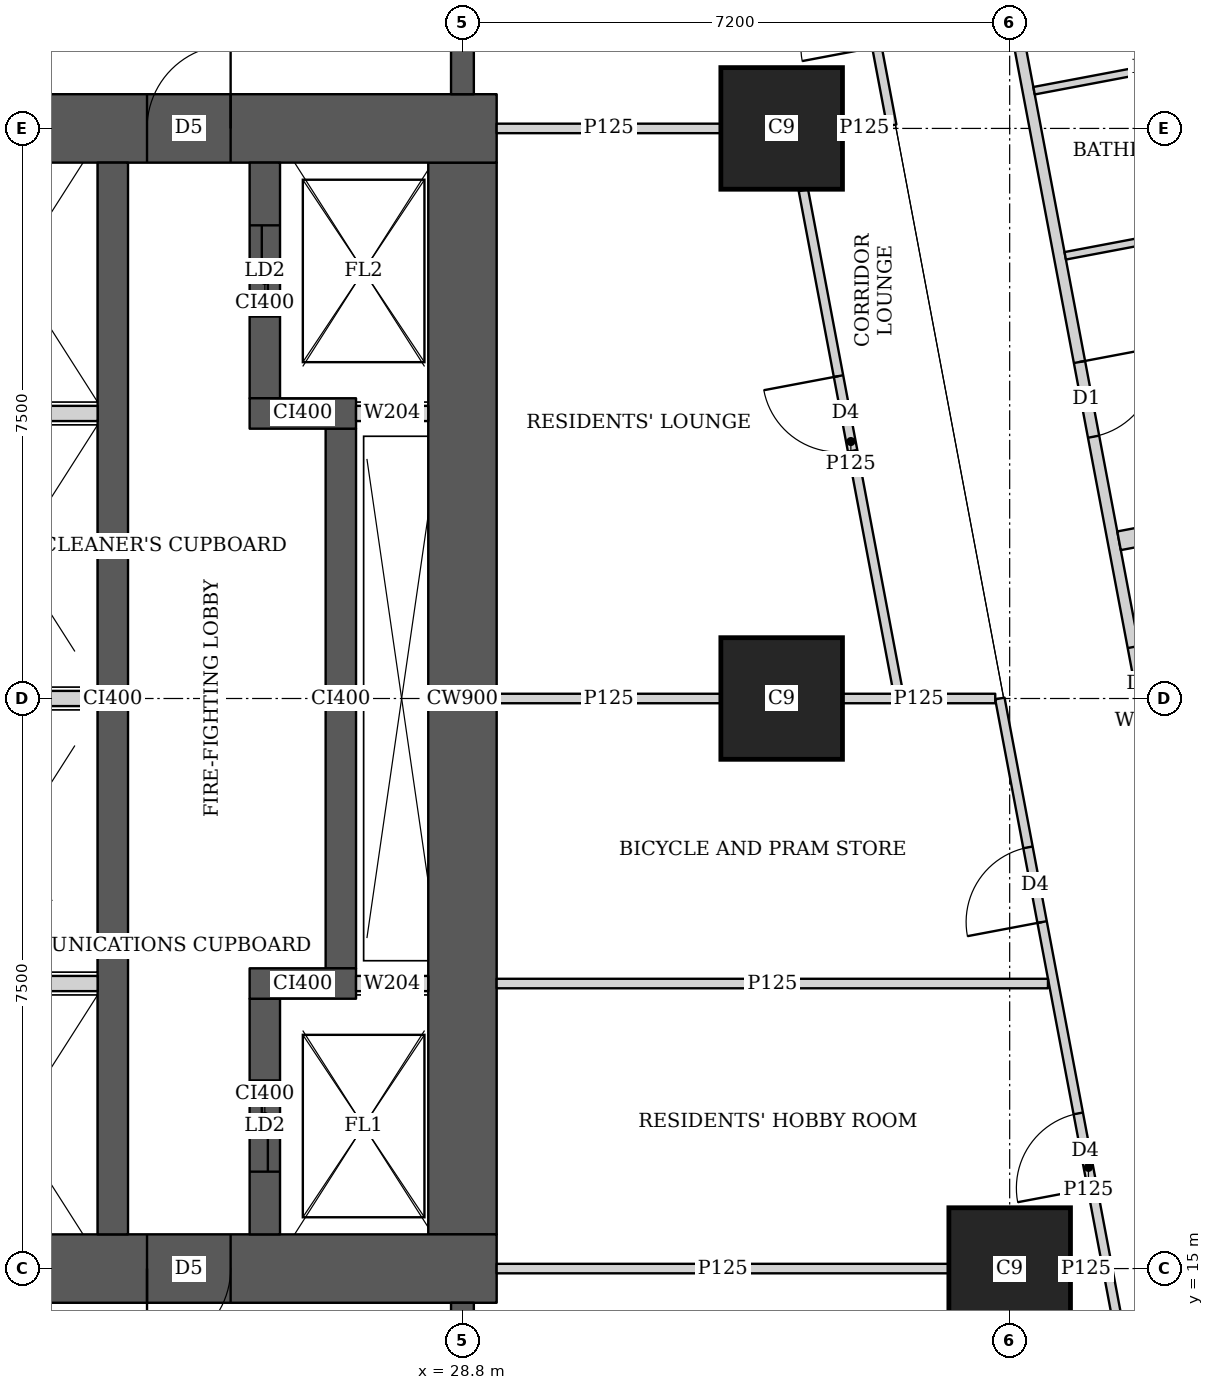
"""IFC4 building model, lengths in metres.
Left out: names, types, materials, properties, quantities, classifications, styles, units other than length and angle.
Written with IfcOpenShell. Run it as: python <this file> out.ifc"""

import sys

from ifc_helpers import new_model, si_unit, direction, frame, frame_2d, origin, origin_2d, place, context, subcontext, project, spatial, rectangle, extrude, element, fill, save


model = new_model("IFC4")
c1 = context("Model", 3, precision=1e-05, world=origin(), true_north=direction((0.0, 1.0)))
c2 = subcontext(c1, "Body", "Model", "MODEL_VIEW")
j1 = project(units=[si_unit("LENGTHUNIT", "METRE"), si_unit("PLANEANGLEUNIT", "RADIAN")], contexts=[c1])
p1 = place(None, origin())
s1 = spatial("IfcSite", under=j1, at=p1, CompositionType="ELEMENT")
p2 = place(p1, origin())
s2 = spatial("IfcBuilding", under=s1, at=p2, CompositionType="ELEMENT")
p3 = place(p2, frame((0.0, 0.0, 77.9)))
s3 = spatial("IfcBuildingStorey", under=s2, at=p3, CompositionType="ELEMENT", Elevation=77.9)
for number, where, z_axis, x_axis in (
    (1, (36.0, 15.0, 0.0), (0.0, 0.0, 1.0), (1.0, 0.0, 0.0)),
    (2, (33.0, 22.5, 0.0), (0.0, 0.0, 1.0), (1.0, 0.0, 0.0)),
    (3, (33.0, 30.0, 0.0), (0.0, 0.0, 1.0), (1.0, 0.0, 0.0)),
):
    element("IfcColumn", number, at=place(p3, frame(where, z_axis=z_axis, x_axis=x_axis)), inside=s3, PredefinedType="COLUMN", context=c2, shape_type="SweptSolid", body=[
        extrude(rectangle(XDim=1.6, YDim=1.6, at=origin_2d()), origin(), (0.0, 0.0, 1.0), 3.75),
    ])
p4 = place(p3, frame((13.95, 15.0, 0.0), z_axis=(0.0, 0.0, 1.0), x_axis=(1.0, 0.0, 0.0)))
e4 = element("IfcWall", 4, at=p4, inside=s3, PredefinedType="SHEAR", context=c2, shape_type="SweptSolid", body=[
    extrude(rectangle(XDim=15.3, YDim=0.9, at=frame_2d((7.65, 0.0))), origin(), (0.0, 0.0, 1.0), 3.75),
])
p5 = place(p4, frame((4.45, 0.0, 0.0)))
e5 = element("IfcOpeningElement", 5, at=p5, cuts=e4, PredefinedType="OPENING", context=c2, shape_type="SweptSolid", body=[
    extrude(rectangle(XDim=1.8, YDim=2.1, at=frame_2d((0.9, 1.05))), frame((0.0, 0.46, 0.0), z_axis=(0.0, -1.0, 0.0), x_axis=(1.0, 0.0, 0.0)), (0.0, 0.0, 1.0), 0.92),
])
p6 = place(p4, frame((10.7, 0.0, 0.0)))
e6 = element("IfcOpeningElement", 6, at=p6, cuts=e4, PredefinedType="OPENING", context=c2, shape_type="SweptSolid", body=[
    extrude(rectangle(XDim=1.1, YDim=2.1, at=frame_2d((0.55, 1.05))), frame((0.0, 0.46, 0.0), z_axis=(0.0, -1.0, 0.0), x_axis=(1.0, 0.0, 0.0)), (0.0, 0.0, 1.0), 0.92),
])
p7 = place(p3, frame((13.95, 30.0, 0.0), z_axis=(0.0, 0.0, 1.0), x_axis=(1.0, 0.0, 0.0)))
e7 = element("IfcWall", 7, at=p7, inside=s3, PredefinedType="SHEAR", context=c2, shape_type="SweptSolid", body=[
    extrude(rectangle(XDim=15.3, YDim=0.9, at=frame_2d((7.65, 0.0))), origin(), (0.0, 0.0, 1.0), 3.75),
])
p8 = place(p7, frame((4.45, 0.0, 0.0)))
e8 = element("IfcOpeningElement", 8, at=p8, cuts=e7, PredefinedType="OPENING", context=c2, shape_type="SweptSolid", body=[
    extrude(rectangle(XDim=1.8, YDim=2.1, at=frame_2d((0.9, 1.05))), frame((0.0, 0.46, 0.0), z_axis=(0.0, -1.0, 0.0), x_axis=(1.0, 0.0, 0.0)), (0.0, 0.0, 1.0), 0.92),
])
p9 = place(p7, frame((10.7, 0.0, 0.0)))
e9 = element("IfcOpeningElement", 9, at=p9, cuts=e7, PredefinedType="OPENING", context=c2, shape_type="SweptSolid", body=[
    extrude(rectangle(XDim=1.1, YDim=2.1, at=frame_2d((0.55, 1.05))), frame((0.0, 0.46, 0.0), z_axis=(0.0, -1.0, 0.0), x_axis=(1.0, 0.0, 0.0)), (0.0, 0.0, 1.0), 0.92),
])
p10 = place(p3, frame((28.8, 15.45, 0.0), z_axis=(0.0, 0.0, 1.0), x_axis=(0.0, 1.0, 0.0)))
e10 = element("IfcWall", 10, at=p10, inside=s3, PredefinedType="SHEAR", context=c2, shape_type="SweptSolid", body=[
    extrude(rectangle(XDim=14.1, YDim=0.9, at=frame_2d((7.05, 0.0))), origin(), (0.0, 0.0, 1.0), 3.75),
])
p11 = place(p3, frame((24.2, 15.45, 0.0), z_axis=(0.0, 0.0, 1.0), x_axis=(0.0, 1.0, 0.0)))
e11 = element("IfcWall", 11, at=p11, inside=s3, PredefinedType="SHEAR", context=c2, shape_type="SweptSolid", body=[
    extrude(rectangle(XDim=14.1, YDim=0.4, at=frame_2d((7.05, 0.0))), origin(), (0.0, 0.0, 1.0), 3.75),
])
p12 = place(p3, frame((26.2, 15.45, 0.0), z_axis=(0.0, 0.0, 1.0), x_axis=(0.0, 1.0, 0.0)))
e12 = element("IfcWall", 12, at=p12, inside=s3, PredefinedType="SHEAR", context=c2, shape_type="SweptSolid", body=[
    extrude(rectangle(XDim=3.1, YDim=0.4, at=frame_2d((1.55, 0.0))), origin(), (0.0, 0.0, 1.0), 3.75),
])
p13 = place(p12, frame((0.825, 0.0, 0.0)))
e13 = element("IfcOpeningElement", 13, at=p13, cuts=e12, PredefinedType="OPENING", context=c2, shape_type="SweptSolid", body=[
    extrude(rectangle(XDim=1.2, YDim=2.1, at=frame_2d((0.6, 1.05))), frame((0.0, 0.21, 0.0), z_axis=(0.0, -1.0, 0.0), x_axis=(1.0, 0.0, 0.0)), (0.0, 0.0, 1.0), 0.42),
])
p14 = place(p3, frame((26.0, 18.75, 0.0), z_axis=(0.0, 0.0, 1.0), x_axis=(1.0, 0.0, 0.0)))
e14 = element("IfcWall", 14, at=p14, inside=s3, PredefinedType="SHEAR", context=c2, shape_type="SweptSolid", body=[
    extrude(rectangle(XDim=1.4, YDim=0.4, at=frame_2d((0.7, 0.0))), origin(), (0.0, 0.0, 1.0), 3.75),
])
p15 = place(p3, frame((27.2, 18.95, 0.0), z_axis=(0.0, 0.0, 1.0), x_axis=(0.0, 1.0, 0.0)))
e15 = element("IfcWall", 15, at=p15, inside=s3, PredefinedType="SHEAR", context=c2, shape_type="SweptSolid", body=[
    extrude(rectangle(XDim=7.1, YDim=0.4, at=frame_2d((3.55, 0.0))), origin(), (0.0, 0.0, 1.0), 3.75),
])
p16 = place(p3, frame((26.0, 26.25, 0.0), z_axis=(0.0, 0.0, 1.0), x_axis=(1.0, 0.0, 0.0)))
e16 = element("IfcWall", 16, at=p16, inside=s3, PredefinedType="SHEAR", context=c2, shape_type="SweptSolid", body=[
    extrude(rectangle(XDim=1.4, YDim=0.4, at=frame_2d((0.7, 0.0))), origin(), (0.0, 0.0, 1.0), 3.75),
])
p17 = place(p3, frame((26.2, 26.45, 0.0), z_axis=(0.0, 0.0, 1.0), x_axis=(0.0, 1.0, 0.0)))
e17 = element("IfcWall", 17, at=p17, inside=s3, PredefinedType="SHEAR", context=c2, shape_type="SweptSolid", body=[
    extrude(rectangle(XDim=3.1, YDim=0.4, at=frame_2d((1.55, 0.0))), origin(), (0.0, 0.0, 1.0), 3.75),
])
p18 = place(p17, frame((1.075, 0.0, 0.0)))
e18 = element("IfcOpeningElement", 18, at=p18, cuts=e17, PredefinedType="OPENING", context=c2, shape_type="SweptSolid", body=[
    extrude(rectangle(XDim=1.2, YDim=2.1, at=frame_2d((0.6, 1.05))), frame((0.0, 0.21, 0.0), z_axis=(0.0, -1.0, 0.0), x_axis=(1.0, 0.0, 0.0)), (0.0, 0.0, 1.0), 0.42),
])
for number, where, z_axis, x_axis in (
    (19, (28.8, 10.35, 0.0), (0.0, 0.0, 1.0), (0.0, 1.0, 0.0)),
    (20, (28.8, 30.45, 0.0), (0.0, 0.0, 1.0), (0.0, 1.0, 0.0)),
):
    element("IfcWall", number, at=place(p3, frame(where, z_axis=z_axis, x_axis=x_axis)), inside=s3, PredefinedType="SHEAR", context=c2, shape_type="SweptSolid", body=[
        extrude(rectangle(XDim=4.2, YDim=0.3, at=frame_2d((2.1, 0.0))), origin(), (0.0, 0.0, 1.0), 3.75),
    ])
p19 = place(p3, frame((33.382, 45.65, 0.0), z_axis=(0.0, 0.0, 1.0), x_axis=(0.185593544777, -0.982626600565, 0.0)))
e21 = element("IfcWall", 21, at=p19, inside=s3, PredefinedType="SOLIDWALL", context=c2, shape_type="SweptSolid", body=[
    extrude(rectangle(XDim=47.118, YDim=0.15, at=frame_2d((23.559, 0.0))), origin(), (0.0, 0.0, 1.0), 2.2),
])
p20 = place(p19, frame((19.054, 0.0, 0.0)))
e22 = element("IfcOpeningElement", 22, at=p20, cuts=e21, PredefinedType="OPENING", context=c2, shape_type="SweptSolid", body=[
    extrude(rectangle(XDim=1.0, YDim=2.1, at=frame_2d((0.5, 1.05))), frame((0.0, 0.085, 0.0), z_axis=(0.0, -1.0, 0.0), x_axis=(1.0, 0.0, 0.0)), (0.0, 0.0, 1.0), 0.17),
])
p21 = place(p19, frame((22.87, 0.0, 0.0)))
e23 = element("IfcOpeningElement", 23, at=p21, cuts=e21, PredefinedType="OPENING", context=c2, shape_type="SweptSolid", body=[
    extrude(rectangle(XDim=1.0, YDim=2.1, at=frame_2d((0.5, 1.05))), frame((0.0, 0.085, 0.0), z_axis=(0.0, -1.0, 0.0), x_axis=(1.0, 0.0, 0.0)), (0.0, 0.0, 1.0), 0.17),
])
p22 = place(p19, frame((33.833, 0.0, 0.0)))
e24 = element("IfcOpeningElement", 24, at=p22, cuts=e21, PredefinedType="OPENING", context=c2, shape_type="SweptSolid", body=[
    extrude(rectangle(XDim=1.0, YDim=2.1, at=frame_2d((0.5, 1.05))), frame((0.0, 0.085, 0.0), z_axis=(0.0, -1.0, 0.0), x_axis=(1.0, 0.0, 0.0)), (0.0, 0.0, 1.0), 0.17),
])
p23 = place(p3, frame((37.473, 42.309, 0.0), z_axis=(0.0, 0.0, 1.0), x_axis=(0.185570636839, -0.982630927024, 0.0)))
e25 = element("IfcWall", 25, at=p23, inside=s3, PredefinedType="PARTITIONING", context=c2, shape_type="SweptSolid", body=[
    extrude(rectangle(XDim=13.553, YDim=0.1, at=frame_2d((6.777, 0.0))), origin(), (0.0, 0.0, 1.0), 2.5),
])
p24 = place(p23, frame((12.049, 0.0, 0.0)))
e26 = element("IfcOpeningElement", 26, at=p24, cuts=e25, PredefinedType="OPENING", context=c2, shape_type="SweptSolid", body=[
    extrude(rectangle(XDim=0.9, YDim=2.1, at=frame_2d((0.45, 1.05))), frame((0.0, 0.06, 0.0), z_axis=(0.0, -1.0, 0.0), x_axis=(1.0, 0.0, 0.0)), (0.0, 0.0, 1.0), 0.12),
])
p25 = place(p23, frame((8.427, 0.0, 0.0)))
e27 = element("IfcOpeningElement", 27, at=p25, cuts=e25, PredefinedType="OPENING", context=c2, shape_type="SweptSolid", body=[
    extrude(rectangle(XDim=0.9, YDim=2.1, at=frame_2d((0.45, 1.05))), frame((0.0, 0.06, 0.0), z_axis=(0.0, -1.0, 0.0), x_axis=(1.0, 0.0, 0.0)), (0.0, 0.0, 1.0), 0.12),
])
p26 = place(p23, frame((2.853, 0.0, 0.0)))
e28 = element("IfcOpeningElement", 28, at=p26, cuts=e25, PredefinedType="OPENING", context=c2, shape_type="SweptSolid", body=[
    extrude(rectangle(XDim=0.9, YDim=2.1, at=frame_2d((0.45, 1.05))), frame((0.0, 0.06, 0.0), z_axis=(0.0, -1.0, 0.0), x_axis=(1.0, 0.0, 0.0)), (0.0, 0.0, 1.0), 0.12),
])
p27 = place(p23, frame((10.14, 0.0, 0.0)))
e29 = element("IfcOpeningElement", 29, at=p27, cuts=e25, PredefinedType="OPENING", context=c2, shape_type="SweptSolid", body=[
    extrude(rectangle(XDim=0.9, YDim=2.1, at=frame_2d((0.45, 1.05))), frame((0.0, 0.06, 0.0), z_axis=(0.0, -1.0, 0.0), x_axis=(1.0, 0.0, 0.0)), (0.0, 0.0, 1.0), 0.12),
])
p28 = place(p23, frame((5.759, 0.0, 0.0)))
e30 = element("IfcOpeningElement", 30, at=p28, cuts=e25, PredefinedType="OPENING", context=c2, shape_type="SweptSolid", body=[
    extrude(rectangle(XDim=0.9, YDim=2.1, at=frame_2d((0.45, 1.05))), frame((0.0, 0.06, 0.0), z_axis=(0.0, -1.0, 0.0), x_axis=(1.0, 0.0, 0.0)), (0.0, 0.0, 1.0), 0.12),
])
p29 = place(p3, frame((39.997, 28.942, 0.0), z_axis=(0.0, 0.0, 1.0), x_axis=(-0.982569883123, -0.185893584556, 0.0)))
e31 = element("IfcWall", 31, at=p29, inside=s3, PredefinedType="PARTITIONING", context=c2, shape_type="SweptSolid", body=[
    extrude(rectangle(XDim=3.324, YDim=0.1, at=frame_2d((1.662, 0.0))), origin(), (0.0, 0.0, 1.0), 3.5),
])
p30 = place(p3, frame((39.538, 31.104, 0.0), z_axis=(0.0, 0.0, 1.0), x_axis=(-0.982610347627, -0.185679575441, 0.0)))
e32 = element("IfcWall", 32, at=p30, inside=s3, PredefinedType="PARTITIONING", context=c2, shape_type="SweptSolid", body=[
    extrude(rectangle(XDim=3.274, YDim=0.1, at=frame_2d((1.637, 0.0))), origin(), (0.0, 0.0, 1.0), 2.5),
])
p31 = place(p3, frame((41.885, 25.415, 0.0), z_axis=(0.0, 0.0, 1.0), x_axis=(-0.982612837616, -0.185666398014, 0.0)))
e33 = element("IfcWall", 33, at=p31, inside=s3, PredefinedType="SOLIDWALL", context=c2, shape_type="SweptSolid", body=[
    extrude(rectangle(XDim=4.525, YDim=0.25, at=frame_2d((2.262, 0.0))), origin(), (0.0, 0.0, 1.0), 3.5),
])
p32 = place(p3, frame((38.202, 10.163, 0.0), z_axis=(0.0, 0.0, 1.0), x_axis=(-0.185645577403, 0.982616771479, 0.0)))
e34 = element("IfcWall", 34, at=p32, inside=s3, PredefinedType="PARTITIONING", context=c2, shape_type="SweptSolid", body=[
    extrude(rectangle(XDim=12.555, YDim=0.125, at=frame_2d((6.278, 0.0))), origin(), (0.0, 0.0, 1.0), 2.5),
])
p33 = place(p32, frame((0.708, 0.0, 0.0)))
e35 = element("IfcOpeningElement", 35, at=p33, cuts=e34, PredefinedType="OPENING", context=c2, shape_type="SweptSolid", body=[
    extrude(rectangle(XDim=1.0, YDim=2.1, at=frame_2d((0.5, 1.05))), frame((0.0, 0.073, 0.0), z_axis=(0.0, -1.0, 0.0), x_axis=(1.0, 0.0, 0.0)), (0.0, 0.0, 1.0), 0.145),
])
p34 = place(p32, frame((6.0, 0.0, 0.0)))
e36 = element("IfcOpeningElement", 36, at=p34, cuts=e34, PredefinedType="OPENING", context=c2, shape_type="SweptSolid", body=[
    extrude(rectangle(XDim=1.0, YDim=2.1, at=frame_2d((0.5, 1.05))), frame((0.0, 0.073, 0.0), z_axis=(0.0, -1.0, 0.0), x_axis=(1.0, 0.0, 0.0)), (0.0, 0.0, 1.0), 0.145),
])
p35 = place(p32, frame((9.562, 0.0, 0.0)))
e37 = element("IfcOpeningElement", 37, at=p35, cuts=e34, PredefinedType="OPENING", context=c2, shape_type="SweptSolid", body=[
    extrude(rectangle(XDim=1.0, YDim=2.1, at=frame_2d((0.5, 1.05))), frame((0.0, 0.073, 0.0), z_axis=(0.0, -1.0, 0.0), x_axis=(1.0, 0.0, 0.0)), (0.0, 0.0, 1.0), 0.145),
])
p36 = place(p3, frame((34.448, 30.04, 0.0), z_axis=(0.0, 0.0, 1.0), x_axis=(-0.185749459238, 0.982597139418, 0.0)))
e38 = element("IfcWall", 38, at=p36, inside=s3, PredefinedType="PARTITIONING", context=c2, shape_type="SweptSolid", body=[
    extrude(rectangle(XDim=4.883, YDim=0.125, at=frame_2d((2.441, 0.0))), origin(), (0.0, 0.0, 1.0), 2.5),
])
p37 = place(p36, frame((1.05, 0.0, 0.0)))
e39 = element("IfcOpeningElement", 39, at=p37, cuts=e38, PredefinedType="OPENING", context=c2, shape_type="SweptSolid", body=[
    extrude(rectangle(XDim=1.0, YDim=2.1, at=frame_2d((0.5, 1.05))), frame((0.0, 0.073, 0.0), z_axis=(0.0, -1.0, 0.0), x_axis=(1.0, 0.0, 0.0)), (0.0, 0.0, 1.0), 0.145),
])
p38 = place(p3, frame((34.535, 22.574, 0.0), z_axis=(0.0, 0.0, 1.0), x_axis=(-0.185591596381, 0.982626968566, 0.0)))
e40 = element("IfcWall", 40, at=p38, inside=s3, PredefinedType="PARTITIONING", context=c2, shape_type="SweptSolid", body=[
    extrude(rectangle(XDim=6.73, YDim=0.125, at=frame_2d((3.365, 0.0))), origin(), (0.0, 0.0, 1.0), 2.5),
])
p39 = place(p38, frame((3.241, 0.0, 0.0)))
e41 = element("IfcOpeningElement", 41, at=p39, cuts=e40, PredefinedType="OPENING", context=c2, shape_type="SweptSolid", body=[
    extrude(rectangle(XDim=1.0, YDim=2.1, at=frame_2d((0.5, 1.05))), frame((0.0, 0.073, 0.0), z_axis=(0.0, -1.0, 0.0), x_axis=(1.0, 0.0, 0.0)), (0.0, 0.0, 1.0), 0.145),
])
p40 = place(p3, frame((29.25, 15.0, 0.0), z_axis=(0.0, 0.0, 1.0), x_axis=(1.0, 0.0, 0.0)))
e42 = element("IfcWall", 42, at=p40, inside=s3, PredefinedType="PARTITIONING", context=c2, shape_type="SweptSolid", body=[
    extrude(rectangle(XDim=5.949, YDim=0.125, at=frame_2d((2.975, 0.0))), origin(), (0.0, 0.0, 1.0), 3.5),
])
p41 = place(p3, frame((36.801, 15.0, 0.0), z_axis=(0.0, 0.0, 1.0), x_axis=(1.0, 0.0, 0.0)))
e43 = element("IfcWall", 43, at=p41, inside=s3, PredefinedType="PARTITIONING", context=c2, shape_type="SweptSolid", body=[
    extrude(rectangle(XDim=0.412, YDim=0.125, at=frame_2d((0.206, 0.0))), origin(), (0.0, 0.0, 1.0), 3.5),
])
p42 = place(p3, frame((29.25, 18.75, 0.0), z_axis=(0.0, 0.0, 1.0), x_axis=(1.0, 0.0, 0.0)))
e44 = element("IfcWall", 44, at=p42, inside=s3, PredefinedType="PARTITIONING", context=c2, shape_type="SweptSolid", body=[
    extrude(rectangle(XDim=7.254, YDim=0.125, at=frame_2d((3.627, 0.0))), origin(), (0.0, 0.0, 1.0), 3.5),
])
p43 = place(p3, frame((29.25, 22.5, 0.0), z_axis=(0.0, 0.0, 1.0), x_axis=(1.0, 0.0, 0.0)))
e45 = element("IfcWall", 45, at=p43, inside=s3, PredefinedType="PARTITIONING", context=c2, shape_type="SweptSolid", body=[
    extrude(rectangle(XDim=2.949, YDim=0.125, at=frame_2d((1.475, 0.0))), origin(), (0.0, 0.0, 1.0), 3.5),
])
p44 = place(p3, frame((33.801, 22.5, 0.0), z_axis=(0.0, 0.0, 1.0), x_axis=(1.0, 0.0, 0.0)))
e46 = element("IfcWall", 46, at=p44, inside=s3, PredefinedType="PARTITIONING", context=c2, shape_type="SweptSolid", body=[
    extrude(rectangle(XDim=2.009, YDim=0.125, at=frame_2d((1.004, 0.0))), origin(), (0.0, 0.0, 1.0), 2.5),
])
p45 = place(p3, frame((29.25, 30.0, 0.0), z_axis=(0.0, 0.0, 1.0), x_axis=(1.0, 0.0, 0.0)))
e47 = element("IfcWall", 47, at=p45, inside=s3, PredefinedType="PARTITIONING", context=c2, shape_type="SweptSolid", body=[
    extrude(rectangle(XDim=2.949, YDim=0.125, at=frame_2d((1.475, 0.0))), origin(), (0.0, 0.0, 1.0), 3.5),
])
p46 = place(p3, frame((33.801, 30.0, 0.0), z_axis=(0.0, 0.0, 1.0), x_axis=(1.0, 0.0, 0.0)))
e48 = element("IfcWall", 48, at=p46, inside=s3, PredefinedType="PARTITIONING", context=c2, shape_type="SweptSolid", body=[
    extrude(rectangle(XDim=0.579, YDim=0.125, at=frame_2d((0.29, 0.0))), origin(), (0.0, 0.0, 1.0), 2.5),
])
for number, where, z_axis, x_axis in (
    (49, (21.8, 18.75, 0.0), (0.0, 0.0, 1.0), (1.0, 0.0, 0.0)),
    (50, (21.8, 22.5, 0.0), (0.0, 0.0, 1.0), (1.0, 0.0, 0.0)),
    (51, (21.8, 26.25, 0.0), (0.0, 0.0, 1.0), (1.0, 0.0, 0.0)),
):
    element("IfcWall", number, at=place(p3, frame(where, z_axis=z_axis, x_axis=x_axis)), inside=s3, PredefinedType="SOLIDWALL", context=c2, shape_type="SweptSolid", body=[
        extrude(rectangle(XDim=2.2, YDim=0.2, at=frame_2d((1.1, 0.0))), origin(), (0.0, 0.0, 1.0), 3.5),
    ])
for number, where, z_axis, x_axis in (
    (52, (27.4, 18.75, 0.0), (0.0, 0.0, 1.0), (1.0, 0.0, 0.0)),
    (53, (27.4, 26.25, 0.0), (0.0, 0.0, 1.0), (1.0, 0.0, 0.0)),
):
    element("IfcWall", number, at=place(p3, frame(where, z_axis=z_axis, x_axis=x_axis)), inside=s3, PredefinedType="SOLIDWALL", context=c2, shape_type="SweptSolid", body=[
        extrude(rectangle(XDim=0.95, YDim=0.2, at=frame_2d((0.475, 0.0))), origin(), (0.0, 0.0, 1.0), 3.5),
    ])
p47 = place(p20, origin())
e54 = element("IfcDoor", 54, at=p47, inside=s3, OperationType="SINGLE_SWING_LEFT", PredefinedType="DOOR", context=c2, shape_type="SweptSolid", body=[
    extrude(rectangle(XDim=1.0, YDim=2.1, at=frame_2d((0.5, 1.05))), frame((0.0, 0.025, 0.0), z_axis=(0.0, -1.0, 0.0), x_axis=(1.0, 0.0, 0.0)), (0.0, 0.0, 1.0), 0.05),
])
fill(e22, e54)
p48 = place(p21, origin())
e55 = element("IfcDoor", 55, at=p48, inside=s3, OperationType="SINGLE_SWING_RIGHT", PredefinedType="DOOR", context=c2, shape_type="SweptSolid", body=[
    extrude(rectangle(XDim=1.0, YDim=2.1, at=frame_2d((0.5, 1.05))), frame((0.0, 0.025, 0.0), z_axis=(0.0, -1.0, 0.0), x_axis=(1.0, 0.0, 0.0)), (0.0, 0.0, 1.0), 0.05),
])
fill(e23, e55)
p49 = place(p34, origin())
e56 = element("IfcDoor", 56, at=p49, inside=s3, OperationType="SINGLE_SWING_LEFT", PredefinedType="DOOR", context=c2, shape_type="SweptSolid", body=[
    extrude(rectangle(XDim=1.0, YDim=2.1, at=frame_2d((0.5, 1.05))), frame((0.0, 0.025, 0.0), z_axis=(0.0, -1.0, 0.0), x_axis=(1.0, 0.0, 0.0)), (0.0, 0.0, 1.0), 0.05),
])
fill(e36, e56)
p50 = place(p35, origin())
e57 = element("IfcDoor", 57, at=p50, inside=s3, OperationType="SINGLE_SWING_LEFT", PredefinedType="DOOR", context=c2, shape_type="SweptSolid", body=[
    extrude(rectangle(XDim=1.0, YDim=2.1, at=frame_2d((0.5, 1.05))), frame((0.0, 0.025, 0.0), z_axis=(0.0, -1.0, 0.0), x_axis=(1.0, 0.0, 0.0)), (0.0, 0.0, 1.0), 0.05),
])
fill(e37, e57)
p51 = place(p39, origin())
e58 = element("IfcDoor", 58, at=p51, inside=s3, OperationType="SINGLE_SWING_RIGHT", PredefinedType="DOOR", context=c2, shape_type="SweptSolid", body=[
    extrude(rectangle(XDim=1.0, YDim=2.1, at=frame_2d((0.5, 1.05))), frame((0.0, 0.025, 0.0), z_axis=(0.0, -1.0, 0.0), x_axis=(1.0, 0.0, 0.0)), (0.0, 0.0, 1.0), 0.05),
])
fill(e41, e58)
p52 = place(p6, origin())
e59 = element("IfcDoor", 59, at=p52, inside=s3, OperationType="SINGLE_SWING_RIGHT", PredefinedType="DOOR", context=c2, shape_type="SweptSolid", body=[
    extrude(rectangle(XDim=1.1, YDim=2.1, at=frame_2d((0.55, 1.05))), frame((0.0, 0.025, 0.0), z_axis=(0.0, -1.0, 0.0), x_axis=(1.0, 0.0, 0.0)), (0.0, 0.0, 1.0), 0.05),
])
fill(e6, e59)
p53 = place(p9, origin())
e60 = element("IfcDoor", 60, at=p53, inside=s3, OperationType="SINGLE_SWING_RIGHT", PredefinedType="DOOR", context=c2, shape_type="SweptSolid", body=[
    extrude(rectangle(XDim=1.1, YDim=2.1, at=frame_2d((0.55, 1.05))), frame((0.0, 0.025, 0.0), z_axis=(0.0, -1.0, 0.0), x_axis=(1.0, 0.0, 0.0)), (0.0, 0.0, 1.0), 0.05),
])
fill(e9, e60)
p54 = place(p13, origin())
e61 = element("IfcDoor", 61, at=p54, inside=s3, OperationType="DOUBLE_DOOR_SLIDING", PredefinedType="DOOR", context=c2, shape_type="SweptSolid", body=[
    extrude(rectangle(XDim=1.2, YDim=2.1, at=frame_2d((0.6, 1.05))), frame((0.0, 0.025, 0.0), z_axis=(0.0, -1.0, 0.0), x_axis=(1.0, 0.0, 0.0)), (0.0, 0.0, 1.0), 0.05),
])
fill(e13, e61)
p55 = place(p18, origin())
e62 = element("IfcDoor", 62, at=p55, inside=s3, OperationType="DOUBLE_DOOR_SLIDING", PredefinedType="DOOR", context=c2, shape_type="SweptSolid", body=[
    extrude(rectangle(XDim=1.2, YDim=2.1, at=frame_2d((0.6, 1.05))), frame((0.0, 0.025, 0.0), z_axis=(0.0, -1.0, 0.0), x_axis=(1.0, 0.0, 0.0)), (0.0, 0.0, 1.0), 0.05),
])
fill(e18, e62)
save(model, sys.argv[1])
